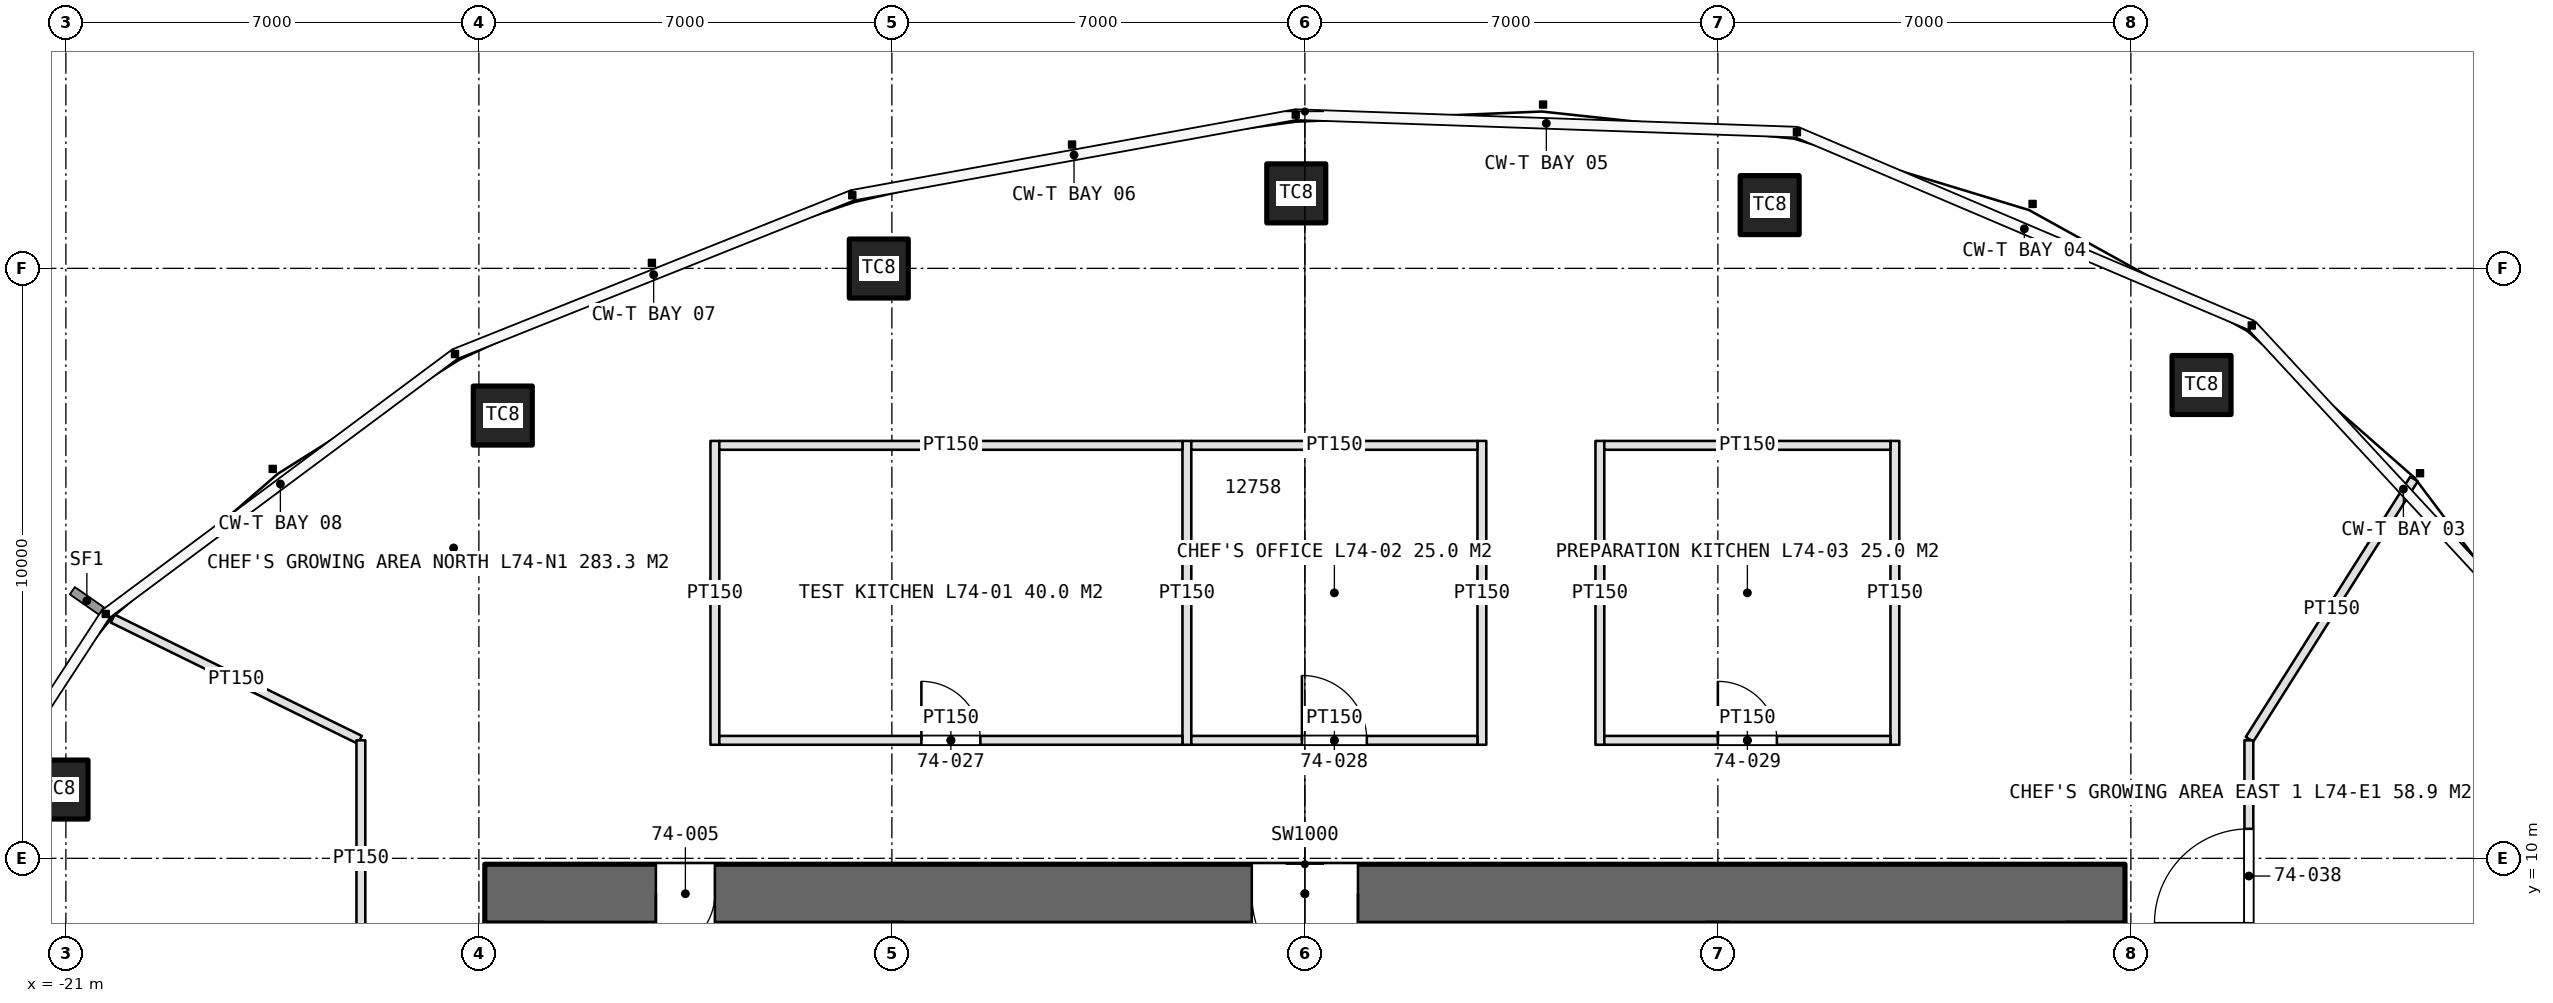
"""IFC4 building model, lengths in metres.
Left out: names, types, materials, properties, quantities, classifications, styles, units other than length and angle.
Written with IfcOpenShell. Run it as: python <this file> out.ifc"""

import sys

from ifc_helpers import new_model, si_unit, direction, frame, frame_2d, origin, origin_2d, place, context, subcontext, project, spatial, rectangle, extrude, element, fill, save


model = new_model("IFC4")
c1 = context("Model", 3, precision=1e-05, world=origin(), true_north=direction((0.0, 1.0)))
c2 = subcontext(c1, "Body", "Model", "MODEL_VIEW")
j1 = project(units=[si_unit("LENGTHUNIT", "METRE"), si_unit("PLANEANGLEUNIT", "RADIAN")], contexts=[c1])
p1 = place(None, origin())
s1 = spatial("IfcSite", under=j1, at=p1, CompositionType="ELEMENT")
p2 = place(p1, origin())
s2 = spatial("IfcBuilding", under=s1, at=p2, CompositionType="ELEMENT")
p3 = place(p2, frame((0.0, 0.0, 330.0)))
s3 = spatial("IfcBuildingStorey", under=s2, at=p3, CompositionType="ELEMENT", Elevation=330.0)
p4 = place(p3, frame((13.9, 9.4, 0.0), z_axis=(0.0, 0.0, 1.0), x_axis=(-1.0, 0.0, 0.0)))
e1 = element("IfcWall", 1, at=p4, inside=s3, PredefinedType="SHEAR", context=c2, shape_type="SweptSolid", body=[
    extrude(rectangle(XDim=27.8, YDim=1.0, at=frame_2d((13.9, 0.0))), origin(), (0.0, 0.0, 1.0), 4.2),
])
p5 = place(p4, frame((23.9, 0.0, 0.0)))
e2 = element("IfcOpeningElement", 2, at=p5, cuts=e1, PredefinedType="OPENING", context=c2, shape_type="SweptSolid", body=[
    extrude(rectangle(XDim=1.0, YDim=2.4, at=frame_2d((0.5, 1.2))), frame((0.0, 0.51, 0.0), z_axis=(0.0, -1.0, 0.0), x_axis=(1.0, 0.0, 0.0)), (0.0, 0.0, 1.0), 1.02),
])
p6 = place(p4, frame((13.0, 0.0, 0.0)))
e3 = element("IfcOpeningElement", 3, at=p6, cuts=e1, PredefinedType="OPENING", context=c2, shape_type="SweptSolid", body=[
    extrude(rectangle(XDim=1.8, YDim=2.4, at=frame_2d((0.9, 1.2))), frame((0.0, 0.51, 0.0), z_axis=(0.0, -1.0, 0.0), x_axis=(1.0, 0.0, 0.0)), (0.0, 0.0, 1.0), 1.02),
])
for number, where, z_axis, x_axis in (
    (4, (15.198, 18.023, 0.0), (0.0, 0.0, 1.0), (1.0, 0.0, 0.0)),
    (5, (7.878, 21.072, 0.0), (0.0, 0.0, 1.0), (1.0, 0.0, 0.0)),
    (6, (-0.146, 21.271, 0.0), (0.0, 0.0, 1.0), (1.0, 0.0, 0.0)),
    (7, (-7.222, 19.997, 0.0), (0.0, 0.0, 1.0), (1.0, 0.0, 0.0)),
    (8, (-13.595, 17.505, 0.0), (0.0, 0.0, 1.0), (1.0, 0.0, 0.0)),
    (9, (-21.125, 11.166, 0.0), (0.0, 0.0, 1.0), (1.0, 0.0, 0.0)),
):
    element("IfcColumn", number, at=place(p3, frame(where, z_axis=z_axis, x_axis=x_axis)), inside=s3, PredefinedType="COLUMN", context=c2, shape_type="SweptSolid", body=[
        extrude(rectangle(XDim=1.0, YDim=1.0, at=origin_2d()), origin(), (0.0, 0.0, 1.0), 4.2),
    ])
for number, where, z_axis, x_axis in (
    (10, (-10.0, 11.925, 0.0), (0.0, 0.0, 1.0), (0.0, 1.0, 0.0)),
    (11, (-2.0, 11.925, 0.0), (0.0, 0.0, 1.0), (0.0, 1.0, 0.0)),
    (12, (3.0, 11.925, 0.0), (0.0, 0.0, 1.0), (0.0, 1.0, 0.0)),
):
    element("IfcWall", number, at=place(p3, frame(where, z_axis=z_axis, x_axis=x_axis)), inside=s3, PredefinedType="PARTITIONING", context=c2, shape_type="SweptSolid", body=[
        extrude(rectangle(XDim=5.15, YDim=0.15, at=frame_2d((2.575, 0.0))), origin(), (0.0, 0.0, 1.0), 3.0),
    ])
p7 = place(p3, frame((-9.925, 12.0, 0.0), z_axis=(0.0, 0.0, 1.0), x_axis=(1.0, 0.0, 0.0)))
e13 = element("IfcWall", 13, at=p7, inside=s3, PredefinedType="PARTITIONING", context=c2, shape_type="SweptSolid", body=[
    extrude(rectangle(XDim=7.85, YDim=0.15, at=frame_2d((3.925, 0.0))), origin(), (0.0, 0.0, 1.0), 3.0),
])
p8 = place(p7, frame((3.425, 0.0, 0.0)))
e14 = element("IfcOpeningElement", 14, at=p8, cuts=e13, PredefinedType="OPENING", context=c2, shape_type="SweptSolid", body=[
    extrude(rectangle(XDim=1.0, YDim=2.2, at=frame_2d((0.5, 1.1))), frame((0.0, 0.085, 0.0), z_axis=(0.0, -1.0, 0.0), x_axis=(1.0, 0.0, 0.0)), (0.0, 0.0, 1.0), 0.17),
])
p9 = place(p3, frame((-9.925, 17.0, 0.0), z_axis=(0.0, 0.0, 1.0), x_axis=(1.0, 0.0, 0.0)))
e15 = element("IfcWall", 15, at=p9, inside=s3, PredefinedType="PARTITIONING", context=c2, shape_type="SweptSolid", body=[
    extrude(rectangle(XDim=7.85, YDim=0.15, at=frame_2d((3.925, 0.0))), origin(), (0.0, 0.0, 1.0), 3.0),
])
p10 = place(p3, frame((-1.925, 12.0, 0.0), z_axis=(0.0, 0.0, 1.0), x_axis=(1.0, 0.0, 0.0)))
e16 = element("IfcWall", 16, at=p10, inside=s3, PredefinedType="PARTITIONING", context=c2, shape_type="SweptSolid", body=[
    extrude(rectangle(XDim=4.85, YDim=0.15, at=frame_2d((2.425, 0.0))), origin(), (0.0, 0.0, 1.0), 3.0),
])
p11 = place(p10, frame((1.875, 0.0, 0.0)))
e17 = element("IfcOpeningElement", 17, at=p11, cuts=e16, PredefinedType="OPENING", context=c2, shape_type="SweptSolid", body=[
    extrude(rectangle(XDim=1.1, YDim=2.3, at=frame_2d((0.55, 1.15))), frame((0.0, 0.085, 0.0), z_axis=(0.0, -1.0, 0.0), x_axis=(1.0, 0.0, 0.0)), (0.0, 0.0, 1.0), 0.17),
])
p12 = place(p3, frame((-1.925, 17.0, 0.0), z_axis=(0.0, 0.0, 1.0), x_axis=(1.0, 0.0, 0.0)))
e18 = element("IfcWall", 18, at=p12, inside=s3, PredefinedType="PARTITIONING", context=c2, shape_type="SweptSolid", body=[
    extrude(rectangle(XDim=4.85, YDim=0.15, at=frame_2d((2.425, 0.0))), origin(), (0.0, 0.0, 1.0), 3.0),
])
for number, where, z_axis, x_axis in (
    (19, (5.0, 11.925, 0.0), (0.0, 0.0, 1.0), (0.0, 1.0, 0.0)),
    (20, (10.0, 11.925, 0.0), (0.0, 0.0, 1.0), (0.0, 1.0, 0.0)),
):
    element("IfcWall", number, at=place(p3, frame(where, z_axis=z_axis, x_axis=x_axis)), inside=s3, PredefinedType="PARTITIONING", context=c2, shape_type="SweptSolid", body=[
        extrude(rectangle(XDim=5.15, YDim=0.15, at=frame_2d((2.575, 0.0))), origin(), (0.0, 0.0, 1.0), 3.0),
    ])
p13 = place(p3, frame((5.075, 12.0, 0.0), z_axis=(0.0, 0.0, 1.0), x_axis=(1.0, 0.0, 0.0)))
e21 = element("IfcWall", 21, at=p13, inside=s3, PredefinedType="PARTITIONING", context=c2, shape_type="SweptSolid", body=[
    extrude(rectangle(XDim=4.85, YDim=0.15, at=frame_2d((2.425, 0.0))), origin(), (0.0, 0.0, 1.0), 3.0),
])
p14 = place(p13, frame((1.925, 0.0, 0.0)))
e22 = element("IfcOpeningElement", 22, at=p14, cuts=e21, PredefinedType="OPENING", context=c2, shape_type="SweptSolid", body=[
    extrude(rectangle(XDim=1.0, YDim=2.2, at=frame_2d((0.5, 1.1))), frame((0.0, 0.085, 0.0), z_axis=(0.0, -1.0, 0.0), x_axis=(1.0, 0.0, 0.0)), (0.0, 0.0, 1.0), 0.17),
])
p15 = place(p3, frame((5.075, 17.0, 0.0), z_axis=(0.0, 0.0, 1.0), x_axis=(1.0, 0.0, 0.0)))
e23 = element("IfcWall", 23, at=p15, inside=s3, PredefinedType="PARTITIONING", context=c2, shape_type="SweptSolid", body=[
    extrude(rectangle(XDim=4.85, YDim=0.15, at=frame_2d((2.425, 0.0))), origin(), (0.0, 0.0, 1.0), 3.0),
])
p16 = place(p3, frame((-16.018, 12.009, 0.0), z_axis=(0.0, 0.0, 1.0), x_axis=(-0.897771840996, 0.440460805879, 0.0)))
e24 = element("IfcWall", 24, at=p16, inside=s3, PredefinedType="PARTITIONING", context=c2, shape_type="SweptSolid", body=[
    extrude(rectangle(XDim=4.666, YDim=0.15, at=frame_2d((2.333, 0.0))), origin(), (0.0, 0.0, 1.0), 3.0),
])
p17 = place(p3, frame((16.011, 12.017, 0.0), z_axis=(0.0, 0.0, 1.0), x_axis=(0.53415837449, 0.845384427916, 0.0)))
e25 = element("IfcWall", 25, at=p17, inside=s3, PredefinedType="PARTITIONING", context=c2, shape_type="SweptSolid", body=[
    extrude(rectangle(XDim=5.22, YDim=0.15, at=frame_2d((2.61, 0.0))), origin(), (0.0, 0.0, 1.0), 3.0),
])
p18 = place(p3, frame((16.0, 4.0, 0.0), z_axis=(0.0, 0.0, 1.0), x_axis=(0.0, 1.0, 0.0)))
e26 = element("IfcWall", 26, at=p18, inside=s3, PredefinedType="PARTITIONING", context=c2, shape_type="SweptSolid", body=[
    extrude(rectangle(XDim=8.0, YDim=0.15, at=frame_2d((4.0, 0.0))), origin(), (0.0, 0.0, 1.0), 3.0),
])
p19 = place(p18, frame((4.9, 0.0, 0.0)))
e27 = element("IfcOpeningElement", 27, at=p19, cuts=e26, PredefinedType="OPENING", context=c2, shape_type="SweptSolid", body=[
    extrude(rectangle(XDim=1.6, YDim=2.4, at=frame_2d((0.8, 1.2))), frame((0.0, 0.085, 0.0), z_axis=(0.0, -1.0, 0.0), x_axis=(1.0, 0.0, 0.0)), (0.0, 0.0, 1.0), 0.17),
])
p20 = place(p3, frame((-16.0, 12.0, 0.0), z_axis=(0.0, 0.0, 1.0), x_axis=(0.0, -1.0, 0.0)))
e28 = element("IfcWall", 28, at=p20, inside=s3, PredefinedType="PARTITIONING", context=c2, shape_type="SweptSolid", body=[
    extrude(rectangle(XDim=4.0, YDim=0.15, at=frame_2d((2.0, 0.0))), origin(), (0.0, 0.0, 1.0), 3.0),
])
p21 = place(p5, origin())
e29 = element("IfcDoor", 29, at=p21, inside=s3, OperationType="SINGLE_SWING_RIGHT", PredefinedType="DOOR", context=c2, shape_type="SweptSolid", body=[
    extrude(rectangle(XDim=1.0, YDim=2.4, at=frame_2d((0.5, 1.2))), frame((0.0, 0.025, 0.0), z_axis=(0.0, -1.0, 0.0), x_axis=(1.0, 0.0, 0.0)), (0.0, 0.0, 1.0), 0.05),
])
fill(e2, e29)
p22 = place(p6, origin())
e30 = element("IfcDoor", 30, at=p22, inside=s3, OperationType="DOUBLE_DOOR_SINGLE_SWING", PredefinedType="DOOR", context=c2, shape_type="SweptSolid", body=[
    extrude(rectangle(XDim=1.8, YDim=2.4, at=frame_2d((0.9, 1.2))), frame((0.0, 0.025, 0.0), z_axis=(0.0, -1.0, 0.0), x_axis=(1.0, 0.0, 0.0)), (0.0, 0.0, 1.0), 0.05),
])
fill(e3, e30)
p23 = place(p8, origin())
e31 = element("IfcDoor", 31, at=p23, inside=s3, OperationType="SINGLE_SWING_LEFT", PredefinedType="DOOR", context=c2, shape_type="SweptSolid", body=[
    extrude(rectangle(XDim=1.0, YDim=2.2, at=frame_2d((0.5, 1.1))), frame((0.0, 0.025, 0.0), z_axis=(0.0, -1.0, 0.0), x_axis=(1.0, 0.0, 0.0)), (0.0, 0.0, 1.0), 0.05),
])
fill(e14, e31)
p24 = place(p11, origin())
e32 = element("IfcDoor", 32, at=p24, inside=s3, OperationType="SINGLE_SWING_LEFT", PredefinedType="DOOR", context=c2, shape_type="SweptSolid", body=[
    extrude(rectangle(XDim=1.1, YDim=2.3, at=frame_2d((0.55, 1.15))), frame((0.0, 0.025, 0.0), z_axis=(0.0, -1.0, 0.0), x_axis=(1.0, 0.0, 0.0)), (0.0, 0.0, 1.0), 0.05),
])
fill(e17, e32)
p25 = place(p14, origin())
e33 = element("IfcDoor", 33, at=p25, inside=s3, OperationType="SINGLE_SWING_LEFT", PredefinedType="DOOR", context=c2, shape_type="SweptSolid", body=[
    extrude(rectangle(XDim=1.0, YDim=2.2, at=frame_2d((0.5, 1.1))), frame((0.0, 0.025, 0.0), z_axis=(0.0, -1.0, 0.0), x_axis=(1.0, 0.0, 0.0)), (0.0, 0.0, 1.0), 0.05),
])
fill(e22, e33)
p26 = place(p19, origin())
e34 = element("IfcDoor", 34, at=p26, inside=s3, OperationType="DOUBLE_DOOR_SINGLE_SWING", PredefinedType="DOOR", context=c2, shape_type="SweptSolid", body=[
    extrude(rectangle(XDim=1.6, YDim=2.4, at=frame_2d((0.8, 1.2))), frame((0.0, 0.025, 0.0), z_axis=(0.0, -1.0, 0.0), x_axis=(1.0, 0.0, 0.0)), (0.0, 0.0, 1.0), 0.05),
])
fill(e27, e34)
save(model, sys.argv[1])
